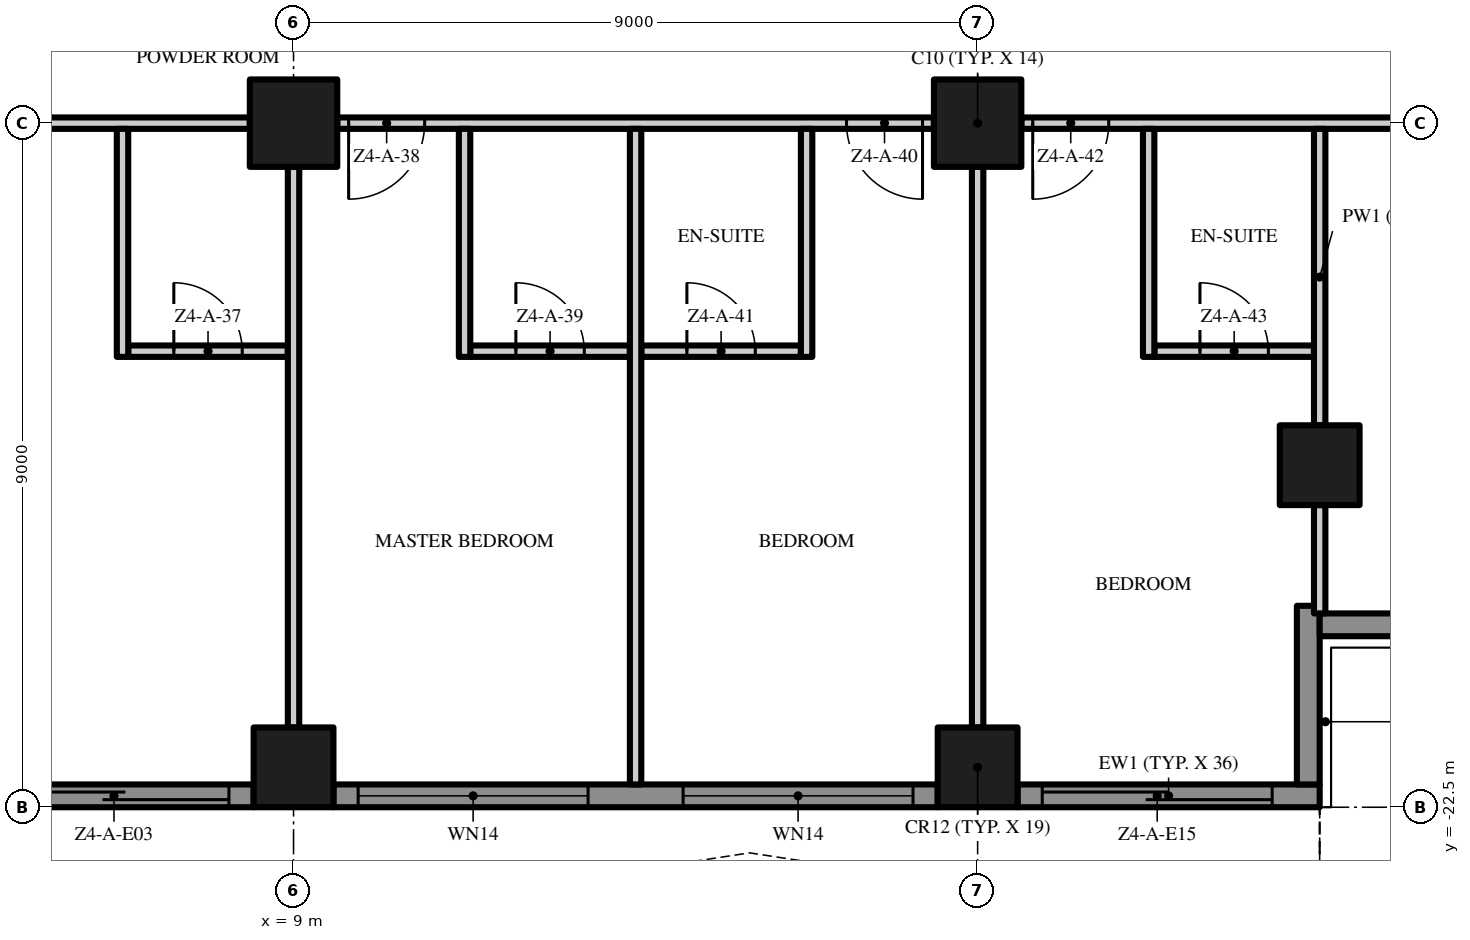
"""IFC4 building model, lengths in metres.
Left out: names, types, materials, properties, quantities, classifications, styles, units other than length and angle.
Written with IfcOpenShell. Run it as: python <this file> out.ifc"""

import sys

from ifc_helpers import new_model, si_unit, direction, frame, frame_2d, origin, origin_2d, place, context, subcontext, project, spatial, polyline, rectangle, outline, extrude, element, fill, save


model = new_model("IFC4")
c1 = context("Model", 3, precision=1e-05, world=origin(), true_north=direction((0.0, 1.0)))
c2 = subcontext(c1, "Body", "Model", "MODEL_VIEW")
j1 = project(units=[si_unit("LENGTHUNIT", "METRE"), si_unit("PLANEANGLEUNIT", "RADIAN")], contexts=[c1])
p1 = place(None, origin())
s1 = spatial("IfcSite", under=j1, at=p1, CompositionType="ELEMENT")
p2 = place(p1, origin())
s2 = spatial("IfcBuilding", under=s1, at=p2, CompositionType="ELEMENT")
p3 = place(p2, frame((0.0, 0.0, 188.2)))
s3 = spatial("IfcBuildingStorey", under=s2, at=p3, CompositionType="ELEMENT", Elevation=188.2)
p4 = place(p3, frame((18.0, -13.5, 0.0), z_axis=(0.0, 0.0, 1.0), x_axis=(1.0, 0.0, 0.0)))
e1 = element("IfcColumn", 1, at=p4, inside=s3, PredefinedType="COLUMN", context=c2, shape_type="SweptSolid", body=[
    extrude(rectangle(XDim=1.15, YDim=1.15, at=origin_2d()), origin(), (0.0, 0.0, 1.0), 3.5),
])
for number, where, z_axis, x_axis in (
    (2, (18.0, -21.975, 0.0), (0.0, 0.0, 1.0), (1.0, 0.0, 0.0)),
    (3, (22.5, -18.0, 0.0), (0.0, 0.0, 1.0), (1.0, 0.0, 0.0)),
):
    element("IfcColumn", number, at=place(p3, frame(where, z_axis=z_axis, x_axis=x_axis)), inside=s3, PredefinedType="COLUMN", context=c2, shape_type="SweptSolid", body=[
        extrude(rectangle(XDim=1.05, YDim=1.05, at=origin_2d()), origin(), (0.0, 0.0, 1.0), 3.5),
    ])
p5 = place(p3, frame((9.0, -13.5, 0.0), z_axis=(0.0, 0.0, 1.0), x_axis=(1.0, 0.0, 0.0)))
e4 = element("IfcColumn", 4, at=p5, inside=s3, PredefinedType="COLUMN", context=c2, shape_type="SweptSolid", body=[
    extrude(rectangle(XDim=1.15, YDim=1.15, at=origin_2d()), origin(), (0.0, 0.0, 1.0), 3.5),
])
p6 = place(p3, frame((9.0, -21.975, 0.0), z_axis=(0.0, 0.0, 1.0), x_axis=(1.0, 0.0, 0.0)))
e5 = element("IfcColumn", 5, at=p6, inside=s3, PredefinedType="COLUMN", context=c2, shape_type="SweptSolid", body=[
    extrude(rectangle(XDim=1.05, YDim=1.05, at=origin_2d()), origin(), (0.0, 0.0, 1.0), 3.5),
])
p7 = place(p3, frame((8.475, -22.35, 0.0), z_axis=(0.0, 0.0, 1.0), x_axis=(-1.0, 0.0, 0.0)))
e6 = element("IfcWall", 6, at=p7, inside=s3, PredefinedType="SOLIDWALL", context=c2, shape_type="SweptSolid", body=[
    extrude(rectangle(XDim=7.95, YDim=0.3, at=frame_2d((3.975, 0.0))), origin(), (0.0, 0.0, 1.0), 3.5),
])
p8 = place(p7, frame((4.6, 0.0, 0.45)))
e7 = element("IfcOpeningElement", 7, at=p8, cuts=e6, PredefinedType="OPENING", context=c2, shape_type="SweptSolid", body=[
    extrude(rectangle(XDim=3.025, YDim=2.65, at=frame_2d((1.512, 1.325))), frame((0.0, 0.16, 0.0), z_axis=(0.0, -1.0, 0.0), x_axis=(1.0, 0.0, 0.0)), (0.0, 0.0, 1.0), 0.32),
])
p9 = place(p7, frame((0.325, 0.0, 0.0)))
e8 = element("IfcOpeningElement", 8, at=p9, cuts=e6, PredefinedType="OPENING", context=c2, shape_type="SweptSolid", body=[
    extrude(rectangle(XDim=3.025, YDim=2.4, at=frame_2d((1.512, 1.2))), frame((0.0, 0.16, 0.0), z_axis=(0.0, -1.0, 0.0), x_axis=(1.0, 0.0, 0.0)), (0.0, 0.0, 1.0), 0.32),
])
p10 = place(p3, frame((17.475, -22.35, 0.0), z_axis=(0.0, 0.0, 1.0), x_axis=(-1.0, 0.0, 0.0)))
e9 = element("IfcWall", 9, at=p10, inside=s3, PredefinedType="SOLIDWALL", context=c2, shape_type="SweptSolid", body=[
    extrude(rectangle(XDim=7.95, YDim=0.3, at=frame_2d((3.975, 0.0))), origin(), (0.0, 0.0, 1.0), 3.5),
])
p11 = place(p10, frame((4.6, 0.0, 0.45)))
e10 = element("IfcOpeningElement", 10, at=p11, cuts=e9, PredefinedType="OPENING", context=c2, shape_type="SweptSolid", body=[
    extrude(rectangle(XDim=3.025, YDim=2.65, at=frame_2d((1.512, 1.325))), frame((0.0, 0.16, 0.0), z_axis=(0.0, -1.0, 0.0), x_axis=(1.0, 0.0, 0.0)), (0.0, 0.0, 1.0), 0.32),
])
p12 = place(p10, frame((0.325, 0.0, 0.45)))
e11 = element("IfcOpeningElement", 11, at=p12, cuts=e9, PredefinedType="OPENING", context=c2, shape_type="SweptSolid", body=[
    extrude(rectangle(XDim=3.025, YDim=2.65, at=frame_2d((1.512, 1.325))), frame((0.0, 0.16, 0.0), z_axis=(0.0, -1.0, 0.0), x_axis=(1.0, 0.0, 0.0)), (0.0, 0.0, 1.0), 0.32),
])
p13 = place(p3, frame((22.5, -22.35, 0.0), z_axis=(0.0, 0.0, 1.0), x_axis=(-1.0, 0.0, 0.0)))
e12 = element("IfcWall", 12, at=p13, inside=s3, PredefinedType="SOLIDWALL", context=c2, shape_type="SweptSolid", body=[
    extrude(rectangle(XDim=3.975, YDim=0.3, at=frame_2d((1.988, 0.0))), origin(), (0.0, 0.0, 1.0), 3.5),
])
p14 = place(p13, frame((0.625, 0.0, 0.0)))
e13 = element("IfcOpeningElement", 13, at=p14, cuts=e12, PredefinedType="OPENING", context=c2, shape_type="SweptSolid", body=[
    extrude(rectangle(XDim=3.025, YDim=2.4, at=frame_2d((1.512, 1.2))), frame((0.0, 0.16, 0.0), z_axis=(0.0, -1.0, 0.0), x_axis=(1.0, 0.0, 0.0)), (0.0, 0.0, 1.0), 0.32),
])
p15 = place(p3, frame((22.35, -19.85, 0.0), z_axis=(0.0, 0.0, 1.0), x_axis=(0.0, -1.0, 0.0)))
e14 = element("IfcWall", 14, at=p15, inside=s3, PredefinedType="SOLIDWALL", context=c2, shape_type="SweptSolid", body=[
    extrude(rectangle(XDim=2.35, YDim=0.3, at=frame_2d((1.175, 0.0))), origin(), (0.0, 0.0, 1.0), 3.5),
])
p16 = place(p3, frame((24.75, -20.1, 0.0), z_axis=(0.0, 0.0, 1.0), x_axis=(-1.0, 0.0, 0.0)))
e15 = element("IfcWall", 15, at=p16, inside=s3, PredefinedType="SOLIDWALL", context=c2, shape_type="SweptSolid", body=[
    extrude(rectangle(XDim=2.25, YDim=0.3, at=frame_2d((1.125, 0.0))), origin(), (0.0, 0.0, 1.0), 3.5),
])
p17 = place(p3, origin())
e16 = element("IfcWall", 16, at=p17, inside=s3, PredefinedType="USERDEFINED", context=c2, shape_type="SweptSolid", body=[
    extrude(outline(polyline([(-22.5, -25.5), (-21.0, -25.271), (-19.5, -24.671), (-18.0, -23.929), (-16.5, -23.329), (-15.0, -23.1), (-13.5, -23.329), (-12.0, -23.929), (-10.5, -24.671), (-9.0, -25.271), (-7.5, -25.5), (-6.0, -25.271), (-4.5, -24.671), (-3.0, -23.929), (-1.5, -23.329), (0.0, -23.1), (1.5, -23.329), (3.0, -23.929), (4.5, -24.671), (6.0, -25.271), (7.5, -25.5), (9.0, -25.271), (10.5, -24.671), (12.0, -23.929), (13.5, -23.329), (15.0, -23.1), (16.5, -23.329), (18.0, -23.929), (19.5, -24.671), (21.0, -25.271), (22.5, -25.5), (22.538, -25.253), (21.066, -25.028), (19.602, -24.442), (18.102, -23.701), (16.566, -23.086), (15.0, -22.847), (13.434, -23.086), (11.898, -23.701), (10.398, -24.442), (8.934, -25.028), (7.5, -25.247), (6.066, -25.028), (4.602, -24.442), (3.102, -23.701), (1.566, -23.086), (0.0, -22.847), (-1.566, -23.086), (-3.102, -23.701), (-4.602, -24.442), (-6.066, -25.028), (-7.5, -25.247), (-8.934, -25.028), (-10.398, -24.442), (-11.898, -23.701), (-13.434, -23.086), (-15.0, -22.847), (-16.566, -23.086), (-18.102, -23.701), (-19.602, -24.442), (-21.066, -25.028), (-22.538, -25.253), (-22.5, -25.5)])), origin(), (0.0, 0.0, 1.0), 0.9),
])
p18 = place(p3, frame((6.825, -16.5, 0.0), z_axis=(0.0, 0.0, 1.0), x_axis=(1.0, 0.0, 0.0)))
e17 = element("IfcWall", 17, at=p18, inside=s3, PredefinedType="PARTITIONING", context=c2, shape_type="SweptSolid", body=[
    extrude(rectangle(XDim=2.1, YDim=0.15, at=frame_2d((1.05, 0.0))), origin(), (0.0, 0.0, 1.0), 3.5),
])
p19 = place(p18, frame((0.6, 0.0, 0.0)))
e18 = element("IfcOpeningElement", 18, at=p19, cuts=e17, PredefinedType="OPENING", context=c2, shape_type="SweptSolid", body=[
    extrude(rectangle(XDim=0.9, YDim=2.1, at=frame_2d((0.45, 1.05))), frame((0.0, 0.085, 0.0), z_axis=(0.0, -1.0, 0.0), x_axis=(1.0, 0.0, 0.0)), (0.0, 0.0, 1.0), 0.17),
])
p20 = place(p3, frame((11.325, -16.5, 0.0), z_axis=(0.0, 0.0, 1.0), x_axis=(1.0, 0.0, 0.0)))
e19 = element("IfcWall", 19, at=p20, inside=s3, PredefinedType="PARTITIONING", context=c2, shape_type="SweptSolid", body=[
    extrude(rectangle(XDim=2.1, YDim=0.15, at=frame_2d((1.05, 0.0))), origin(), (0.0, 0.0, 1.0), 3.5),
])
p21 = place(p20, frame((0.6, 0.0, 0.0)))
e20 = element("IfcOpeningElement", 20, at=p21, cuts=e19, PredefinedType="OPENING", context=c2, shape_type="SweptSolid", body=[
    extrude(rectangle(XDim=0.9, YDim=2.1, at=frame_2d((0.45, 1.05))), frame((0.0, 0.085, 0.0), z_axis=(0.0, -1.0, 0.0), x_axis=(1.0, 0.0, 0.0)), (0.0, 0.0, 1.0), 0.17),
])
p22 = place(p3, frame((13.575, -16.5, 0.0), z_axis=(0.0, 0.0, 1.0), x_axis=(1.0, 0.0, 0.0)))
e21 = element("IfcWall", 21, at=p22, inside=s3, PredefinedType="PARTITIONING", context=c2, shape_type="SweptSolid", body=[
    extrude(rectangle(XDim=2.1, YDim=0.15, at=frame_2d((1.05, 0.0))), origin(), (0.0, 0.0, 1.0), 3.5),
])
p23 = place(p22, frame((0.6, 0.0, 0.0)))
e22 = element("IfcOpeningElement", 22, at=p23, cuts=e21, PredefinedType="OPENING", context=c2, shape_type="SweptSolid", body=[
    extrude(rectangle(XDim=0.9, YDim=2.1, at=frame_2d((0.45, 1.05))), frame((0.0, 0.085, 0.0), z_axis=(0.0, -1.0, 0.0), x_axis=(1.0, 0.0, 0.0)), (0.0, 0.0, 1.0), 0.17),
])
p24 = place(p3, frame((20.325, -16.5, 0.0), z_axis=(0.0, 0.0, 1.0), x_axis=(1.0, 0.0, 0.0)))
e23 = element("IfcWall", 23, at=p24, inside=s3, PredefinedType="PARTITIONING", context=c2, shape_type="SweptSolid", body=[
    extrude(rectangle(XDim=2.1, YDim=0.15, at=frame_2d((1.05, 0.0))), origin(), (0.0, 0.0, 1.0), 3.5),
])
p25 = place(p24, frame((0.6, 0.0, 0.0)))
e24 = element("IfcOpeningElement", 24, at=p25, cuts=e23, PredefinedType="OPENING", context=c2, shape_type="SweptSolid", body=[
    extrude(rectangle(XDim=0.9, YDim=2.1, at=frame_2d((0.45, 1.05))), frame((0.0, 0.085, 0.0), z_axis=(0.0, -1.0, 0.0), x_axis=(1.0, 0.0, 0.0)), (0.0, 0.0, 1.0), 0.17),
])
p26 = place(p3, frame((8.425, -13.5, 0.0), z_axis=(0.0, 0.0, 1.0), x_axis=(-1.0, 0.0, 0.0)))
e25 = element("IfcWall", 25, at=p26, inside=s3, PredefinedType="PARTITIONING", context=c2, shape_type="SweptSolid", body=[
    extrude(rectangle(XDim=7.85, YDim=0.15, at=frame_2d((3.925, 0.0))), origin(), (0.0, 0.0, 1.0), 3.5),
])
p27 = place(p26, frame((4.15, 0.0, 0.0)))
e26 = element("IfcOpeningElement", 26, at=p27, cuts=e25, PredefinedType="OPENING", context=c2, shape_type="SweptSolid", body=[
    extrude(rectangle(XDim=1.8, YDim=2.4, at=frame_2d((0.9, 1.2))), frame((0.0, 0.085, 0.0), z_axis=(0.0, -1.0, 0.0), x_axis=(1.0, 0.0, 0.0)), (0.0, 0.0, 1.0), 0.17),
])
p28 = place(p3, frame((17.425, -13.5, 0.0), z_axis=(0.0, 0.0, 1.0), x_axis=(-1.0, 0.0, 0.0)))
e27 = element("IfcWall", 27, at=p28, inside=s3, PredefinedType="PARTITIONING", context=c2, shape_type="SweptSolid", body=[
    extrude(rectangle(XDim=7.85, YDim=0.15, at=frame_2d((3.925, 0.0))), origin(), (0.0, 0.0, 1.0), 3.5),
])
p29 = place(p28, frame((6.7, 0.0, 0.0)))
e28 = element("IfcOpeningElement", 28, at=p29, cuts=e27, PredefinedType="OPENING", context=c2, shape_type="SweptSolid", body=[
    extrude(rectangle(XDim=1.0, YDim=2.4, at=frame_2d((0.5, 1.2))), frame((0.0, 0.085, 0.0), z_axis=(0.0, -1.0, 0.0), x_axis=(1.0, 0.0, 0.0)), (0.0, 0.0, 1.0), 0.17),
])
p30 = place(p28, frame((0.15, 0.0, 0.0)))
e29 = element("IfcOpeningElement", 29, at=p30, cuts=e27, PredefinedType="OPENING", context=c2, shape_type="SweptSolid", body=[
    extrude(rectangle(XDim=1.0, YDim=2.4, at=frame_2d((0.5, 1.2))), frame((0.0, 0.085, 0.0), z_axis=(0.0, -1.0, 0.0), x_axis=(1.0, 0.0, 0.0)), (0.0, 0.0, 1.0), 0.17),
])
p31 = place(p3, frame((25.95, -13.5, 0.0), z_axis=(0.0, 0.0, 1.0), x_axis=(-1.0, 0.0, 0.0)))
e30 = element("IfcWall", 30, at=p31, inside=s3, PredefinedType="PARTITIONING", context=c2, shape_type="SweptSolid", body=[
    extrude(rectangle(XDim=7.375, YDim=0.15, at=frame_2d((3.688, 0.0))), origin(), (0.0, 0.0, 1.0), 3.5),
])
p32 = place(p31, frame((6.225, 0.0, 0.0)))
e31 = element("IfcOpeningElement", 31, at=p32, cuts=e30, PredefinedType="OPENING", context=c2, shape_type="SweptSolid", body=[
    extrude(rectangle(XDim=1.0, YDim=2.4, at=frame_2d((0.5, 1.2))), frame((0.0, 0.085, 0.0), z_axis=(0.0, -1.0, 0.0), x_axis=(1.0, 0.0, 0.0)), (0.0, 0.0, 1.0), 0.17),
])
p33 = place(p31, frame((0.45, 0.0, 0.0)))
e32 = element("IfcOpeningElement", 32, at=p33, cuts=e30, PredefinedType="OPENING", context=c2, shape_type="SweptSolid", body=[
    extrude(rectangle(XDim=1.5, YDim=2.4, at=frame_2d((0.75, 1.2))), frame((0.0, 0.085, 0.0), z_axis=(0.0, -1.0, 0.0), x_axis=(1.0, 0.0, 0.0)), (0.0, 0.0, 1.0), 0.17),
])
p34 = place(p3, frame((6.75, -16.575, 0.0), z_axis=(0.0, 0.0, 1.0), x_axis=(0.0, 1.0, 0.0)))
e33 = element("IfcWall", 33, at=p34, inside=s3, PredefinedType="PARTITIONING", context=c2, shape_type="SweptSolid", body=[
    extrude(rectangle(XDim=3.0, YDim=0.15, at=frame_2d((1.5, 0.0))), origin(), (0.0, 0.0, 1.0), 3.5),
])
p35 = place(p3, frame((9.0, -21.45, 0.0), z_axis=(0.0, 0.0, 1.0), x_axis=(0.0, 1.0, 0.0)))
e34 = element("IfcWall", 34, at=p35, inside=s3, PredefinedType="PARTITIONING", context=c2, shape_type="SweptSolid", body=[
    extrude(rectangle(XDim=7.375, YDim=0.15, at=frame_2d((3.688, 0.0))), origin(), (0.0, 0.0, 1.0), 3.5),
])
p36 = place(p3, frame((11.25, -16.575, 0.0), z_axis=(0.0, 0.0, 1.0), x_axis=(0.0, 1.0, 0.0)))
e35 = element("IfcWall", 35, at=p36, inside=s3, PredefinedType="PARTITIONING", context=c2, shape_type="SweptSolid", body=[
    extrude(rectangle(XDim=3.0, YDim=0.15, at=frame_2d((1.5, 0.0))), origin(), (0.0, 0.0, 1.0), 3.5),
])
p37 = place(p3, frame((13.5, -22.2, 0.0), z_axis=(0.0, 0.0, 1.0), x_axis=(0.0, 1.0, 0.0)))
e36 = element("IfcWall", 36, at=p37, inside=s3, PredefinedType="PARTITIONING", context=c2, shape_type="SweptSolid", body=[
    extrude(rectangle(XDim=8.625, YDim=0.15, at=frame_2d((4.312, 0.0))), origin(), (0.0, 0.0, 1.0), 3.5),
])
p38 = place(p3, frame((15.75, -16.575, 0.0), z_axis=(0.0, 0.0, 1.0), x_axis=(0.0, 1.0, 0.0)))
e37 = element("IfcWall", 37, at=p38, inside=s3, PredefinedType="PARTITIONING", context=c2, shape_type="SweptSolid", body=[
    extrude(rectangle(XDim=3.0, YDim=0.15, at=frame_2d((1.5, 0.0))), origin(), (0.0, 0.0, 1.0), 3.5),
])
p39 = place(p3, frame((18.0, -21.45, 0.0), z_axis=(0.0, 0.0, 1.0), x_axis=(0.0, 1.0, 0.0)))
e38 = element("IfcWall", 38, at=p39, inside=s3, PredefinedType="PARTITIONING", context=c2, shape_type="SweptSolid", body=[
    extrude(rectangle(XDim=7.375, YDim=0.15, at=frame_2d((3.688, 0.0))), origin(), (0.0, 0.0, 1.0), 3.5),
])
p40 = place(p3, frame((20.25, -16.575, 0.0), z_axis=(0.0, 0.0, 1.0), x_axis=(0.0, 1.0, 0.0)))
e39 = element("IfcWall", 39, at=p40, inside=s3, PredefinedType="PARTITIONING", context=c2, shape_type="SweptSolid", body=[
    extrude(rectangle(XDim=3.0, YDim=0.15, at=frame_2d((1.5, 0.0))), origin(), (0.0, 0.0, 1.0), 3.5),
])
p41 = place(p3, frame((22.5, -19.95, 0.0), z_axis=(0.0, 0.0, 1.0), x_axis=(0.0, 1.0, 0.0)))
e40 = element("IfcWall", 40, at=p41, inside=s3, PredefinedType="PARTITIONING", context=c2, shape_type="SweptSolid", body=[
    extrude(rectangle(XDim=1.425, YDim=0.15, at=frame_2d((0.713, 0.0))), origin(), (0.0, 0.0, 1.0), 3.5),
])
p42 = place(p3, frame((22.5, -17.475, 0.0), z_axis=(0.0, 0.0, 1.0), x_axis=(0.0, 1.0, 0.0)))
e41 = element("IfcWall", 41, at=p42, inside=s3, PredefinedType="PARTITIONING", context=c2, shape_type="SweptSolid", body=[
    extrude(rectangle(XDim=3.9, YDim=0.15, at=frame_2d((1.95, 0.0))), origin(), (0.0, 0.0, 1.0), 3.5),
])
p43 = place(p9, origin())
e42 = element("IfcDoor", 42, at=p43, inside=s3, OperationType="SINGLE_SWING_LEFT", PredefinedType="DOOR", context=c2, shape_type="SweptSolid", body=[
    extrude(rectangle(XDim=3.025, YDim=2.4, at=frame_2d((1.512, 1.2))), frame((0.0, 0.025, 0.0), z_axis=(0.0, -1.0, 0.0), x_axis=(1.0, 0.0, 0.0)), (0.0, 0.0, 1.0), 0.05),
])
fill(e8, e42)
p44 = place(p11, origin())
e43 = element("IfcWindow", 43, at=p44, inside=s3, PartitioningType="SINGLE_PANEL", PredefinedType="WINDOW", context=c2, shape_type="SweptSolid", body=[
    extrude(rectangle(XDim=3.025, YDim=2.65, at=frame_2d((1.512, 1.325))), frame((0.0, 0.03, 0.0), z_axis=(0.0, -1.0, 0.0), x_axis=(1.0, 0.0, 0.0)), (0.0, 0.0, 1.0), 0.06),
])
fill(e10, e43)
p45 = place(p12, origin())
e44 = element("IfcWindow", 44, at=p45, inside=s3, PartitioningType="SINGLE_PANEL", PredefinedType="WINDOW", context=c2, shape_type="SweptSolid", body=[
    extrude(rectangle(XDim=3.025, YDim=2.65, at=frame_2d((1.512, 1.325))), frame((0.0, 0.03, 0.0), z_axis=(0.0, -1.0, 0.0), x_axis=(1.0, 0.0, 0.0)), (0.0, 0.0, 1.0), 0.06),
])
fill(e11, e44)
p46 = place(p14, origin())
e45 = element("IfcDoor", 45, at=p46, inside=s3, OperationType="SINGLE_SWING_LEFT", PredefinedType="DOOR", context=c2, shape_type="SweptSolid", body=[
    extrude(rectangle(XDim=3.025, YDim=2.4, at=frame_2d((1.512, 1.2))), frame((0.0, 0.025, 0.0), z_axis=(0.0, -1.0, 0.0), x_axis=(1.0, 0.0, 0.0)), (0.0, 0.0, 1.0), 0.05),
])
fill(e13, e45)
p47 = place(p19, origin())
e46 = element("IfcDoor", 46, at=p47, inside=s3, OperationType="SINGLE_SWING_LEFT", PredefinedType="DOOR", context=c2, shape_type="SweptSolid", body=[
    extrude(rectangle(XDim=0.9, YDim=2.1, at=frame_2d((0.45, 1.05))), frame((0.0, 0.025, 0.0), z_axis=(0.0, -1.0, 0.0), x_axis=(1.0, 0.0, 0.0)), (0.0, 0.0, 1.0), 0.05),
])
fill(e18, e46)
p48 = place(p29, origin())
e47 = element("IfcDoor", 47, at=p48, inside=s3, OperationType="SINGLE_SWING_RIGHT", PredefinedType="DOOR", context=c2, shape_type="SweptSolid", body=[
    extrude(rectangle(XDim=1.0, YDim=2.4, at=frame_2d((0.5, 1.2))), frame((0.0, 0.025, 0.0), z_axis=(0.0, -1.0, 0.0), x_axis=(1.0, 0.0, 0.0)), (0.0, 0.0, 1.0), 0.05),
])
fill(e28, e47)
p49 = place(p21, origin())
e48 = element("IfcDoor", 48, at=p49, inside=s3, OperationType="SINGLE_SWING_LEFT", PredefinedType="DOOR", context=c2, shape_type="SweptSolid", body=[
    extrude(rectangle(XDim=0.9, YDim=2.1, at=frame_2d((0.45, 1.05))), frame((0.0, 0.025, 0.0), z_axis=(0.0, -1.0, 0.0), x_axis=(1.0, 0.0, 0.0)), (0.0, 0.0, 1.0), 0.05),
])
fill(e20, e48)
p50 = place(p30, origin())
e49 = element("IfcDoor", 49, at=p50, inside=s3, OperationType="SINGLE_SWING_LEFT", PredefinedType="DOOR", context=c2, shape_type="SweptSolid", body=[
    extrude(rectangle(XDim=1.0, YDim=2.4, at=frame_2d((0.5, 1.2))), frame((0.0, 0.025, 0.0), z_axis=(0.0, -1.0, 0.0), x_axis=(1.0, 0.0, 0.0)), (0.0, 0.0, 1.0), 0.05),
])
fill(e29, e49)
p51 = place(p23, origin())
e50 = element("IfcDoor", 50, at=p51, inside=s3, OperationType="SINGLE_SWING_LEFT", PredefinedType="DOOR", context=c2, shape_type="SweptSolid", body=[
    extrude(rectangle(XDim=0.9, YDim=2.1, at=frame_2d((0.45, 1.05))), frame((0.0, 0.025, 0.0), z_axis=(0.0, -1.0, 0.0), x_axis=(1.0, 0.0, 0.0)), (0.0, 0.0, 1.0), 0.05),
])
fill(e22, e50)
p52 = place(p32, origin())
e51 = element("IfcDoor", 51, at=p52, inside=s3, OperationType="SINGLE_SWING_RIGHT", PredefinedType="DOOR", context=c2, shape_type="SweptSolid", body=[
    extrude(rectangle(XDim=1.0, YDim=2.4, at=frame_2d((0.5, 1.2))), frame((0.0, 0.025, 0.0), z_axis=(0.0, -1.0, 0.0), x_axis=(1.0, 0.0, 0.0)), (0.0, 0.0, 1.0), 0.05),
])
fill(e31, e51)
p53 = place(p25, origin())
e52 = element("IfcDoor", 52, at=p53, inside=s3, OperationType="SINGLE_SWING_LEFT", PredefinedType="DOOR", context=c2, shape_type="SweptSolid", body=[
    extrude(rectangle(XDim=0.9, YDim=2.1, at=frame_2d((0.45, 1.05))), frame((0.0, 0.025, 0.0), z_axis=(0.0, -1.0, 0.0), x_axis=(1.0, 0.0, 0.0)), (0.0, 0.0, 1.0), 0.05),
])
fill(e24, e52)
save(model, sys.argv[1])
